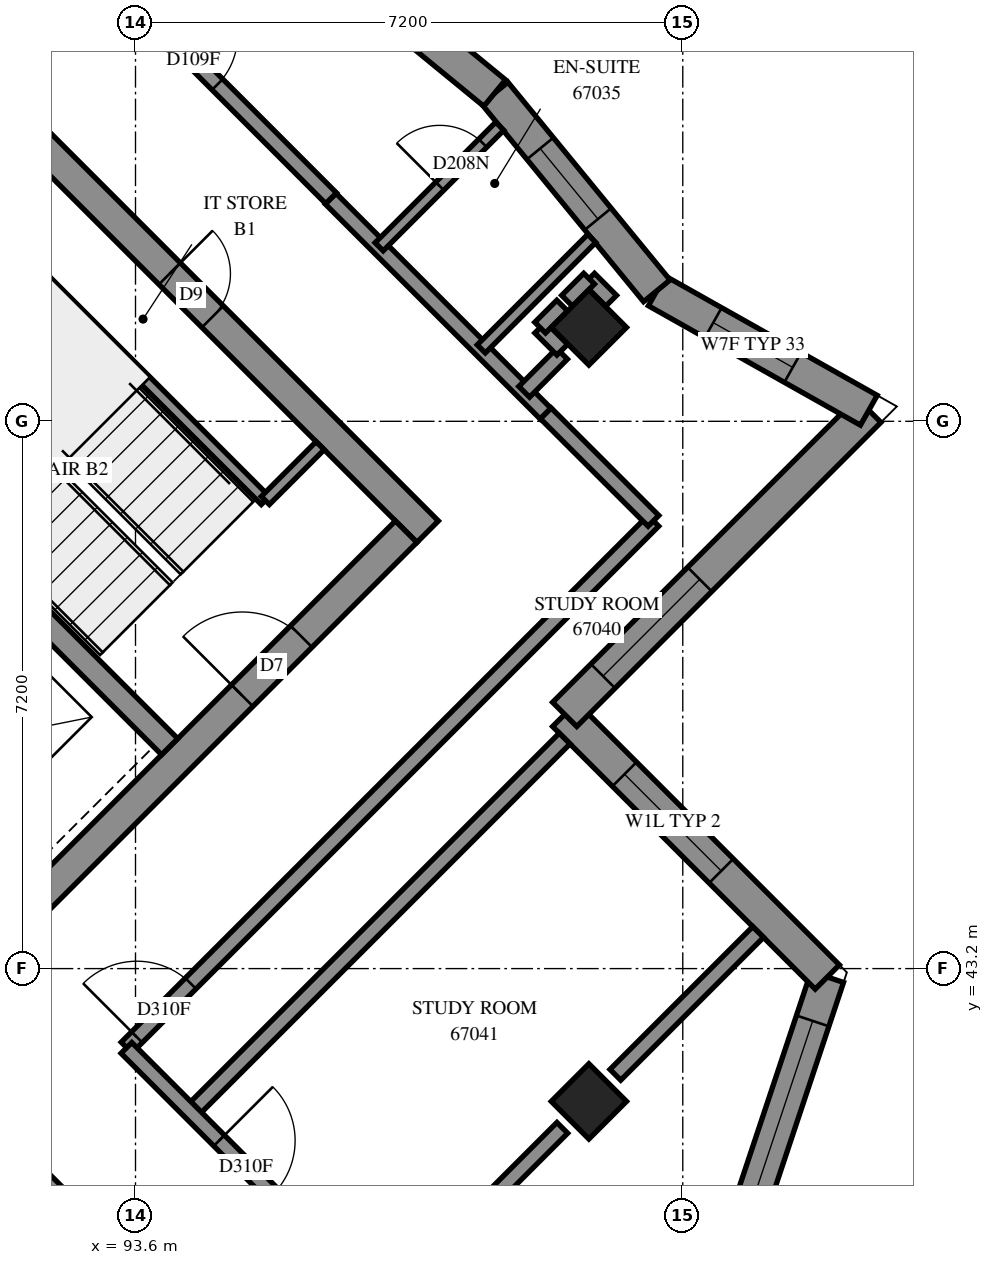
"""IFC4 building model, lengths in metres.
Left out: names, types, materials, properties, quantities, classifications, styles, units other than length and angle.
Written with IfcOpenShell. Run it as: python <this file> out.ifc"""

import sys

from ifc_helpers import new_model, si_unit, direction, frame, frame_2d, origin, origin_2d, place, context, subcontext, project, spatial, polyline, rectangle, outline, extrude, element, fill, save


model = new_model("IFC4")
c1 = context("Model", 3, precision=1e-05, world=origin(), true_north=direction((0.0, 1.0)))
c2 = subcontext(c1, "Body", "Model", "MODEL_VIEW")
j1 = project(units=[si_unit("LENGTHUNIT", "METRE"), si_unit("PLANEANGLEUNIT", "RADIAN")], contexts=[c1])
p1 = place(None, origin())
s1 = spatial("IfcSite", under=j1, at=p1, CompositionType="ELEMENT")
p2 = place(p1, origin())
s2 = spatial("IfcBuilding", under=s1, at=p2, CompositionType="ELEMENT")
p3 = place(p2, frame((0.0, 0.0, 247.2)))
s3 = spatial("IfcBuildingStorey", under=s2, at=p3, CompositionType="ELEMENT", Elevation=247.2)
for number, where, z_axis, x_axis in (
    (1, (99.565, 51.635, 0.0), (0.0, 0.0, 1.0), (0.707, -0.707, 0.0)),
    (2, (99.565, 41.453, 0.0), (0.0, 0.0, 1.0), (0.707, -0.707, 0.0)),
):
    element("IfcColumn", number, at=place(p3, frame(where, z_axis=z_axis, x_axis=x_axis)), inside=s3, PredefinedType="COLUMN", context=c2, shape_type="SweptSolid", body=[
        extrude(rectangle(XDim=0.7, YDim=0.7, at=origin_2d()), origin(), (0.0, 0.0, 1.0), 3.1),
    ])
p4 = place(p3, frame((86.695, 59.696, -0.3), z_axis=(0.0, 0.0, 1.0), x_axis=(0.7071100706, -0.7071034917, 0.0)))
e3 = element("IfcWall", 3, at=p4, inside=s3, PredefinedType="SHEAR", context=c2, shape_type="SweptSolid", body=[
    extrude(rectangle(XDim=15.2, YDim=0.4, at=frame_2d((7.6, 0.0))), origin(), (0.0, 0.0, 1.0), 2.7),
])
p5 = place(p4, frame((10.4, 0.0, 0.3)))
e4 = element("IfcOpeningElement", 4, at=p5, cuts=e3, PredefinedType="OPENING", context=c2, shape_type="SweptSolid", body=[
    extrude(rectangle(XDim=0.8, YDim=2.1, at=frame_2d((0.4, 1.05))), frame((0.0, 0.21, 0.0), z_axis=(0.0, -1.0, 0.0), x_axis=(1.0, 0.0, 0.0)), (0.0, 0.0, 1.0), 0.42),
])
p6 = place(p3, frame((86.978, 38.766, -0.3), z_axis=(0.0, 0.0, 1.0), x_axis=(0.7071067812, 0.7071067812, 0.0)))
e5 = element("IfcWall", 5, at=p6, inside=s3, PredefinedType="SHEAR", context=c2, shape_type="SweptSolid", body=[
    extrude(rectangle(XDim=14.4, YDim=0.4, at=frame_2d((7.2, 0.0))), origin(), (0.0, 0.0, 1.0), 2.7),
])
p7 = place(p6, frame((4.55, 0.0, 0.3)))
e6 = element("IfcOpeningElement", 6, at=p7, cuts=e5, PredefinedType="OPENING", context=c2, shape_type="SweptSolid", body=[
    extrude(rectangle(XDim=1.1, YDim=2.1, at=frame_2d((0.55, 1.05))), frame((0.0, 0.21, 0.0), z_axis=(0.0, -1.0, 0.0), x_axis=(1.0, 0.0, 0.0)), (0.0, 0.0, 1.0), 0.42),
])
p8 = place(p6, frame((11.35, 0.0, 0.3)))
e7 = element("IfcOpeningElement", 7, at=p8, cuts=e5, PredefinedType="OPENING", context=c2, shape_type="SweptSolid", body=[
    extrude(rectangle(XDim=1.1, YDim=2.1, at=frame_2d((0.55, 1.05))), frame((0.0, 0.21, 0.0), z_axis=(0.0, -1.0, 0.0), x_axis=(1.0, 0.0, 0.0)), (0.0, 0.0, 1.0), 0.42),
])
p9 = place(p3, frame((88.958, 51.211, 0.0), z_axis=(0.0, 0.0, 1.0), x_axis=(0.7070998367, -0.7071137256, 0.0)))
e8 = element("IfcWall", 8, at=p9, inside=s3, PredefinedType="SOLIDWALL", context=c2, shape_type="SweptSolid", body=[
    extrude(rectangle(XDim=7.2, YDim=0.3, at=frame_2d((3.6, 0.0))), origin(), (0.0, 0.0, 1.0), 3.1),
])
p10 = place(p3, frame((101.082, 38.232, 0.0), z_axis=(0.0, 0.0, 1.0), x_axis=(0.316227766, 0.9486832981, 0.0)))
e9 = element("IfcWall", 9, at=p10, inside=s3, PredefinedType="SOLIDWALL", context=c2, shape_type="SweptSolid", body=[
    extrude(outline(polyline([(-0.108, -0.225), (5.259, -0.225), (4.981, 0.225), (0.108, 0.225), (-0.108, -0.225)])), origin(), (0.0, 0.0, 1.0), 3.1),
])
p11 = place(p10, frame((1.711, 0.0, 0.45)))
e10 = element("IfcOpeningElement", 10, at=p11, cuts=e9, PredefinedType="OPENING", context=c2, shape_type="SweptSolid", body=[
    extrude(rectangle(XDim=2.8, YDim=2.55, at=frame_2d((1.4, 1.275))), frame((0.0, 0.235, 0.0), z_axis=(0.0, -1.0, 0.0), x_axis=(1.0, 0.0, 0.0)), (0.0, 0.0, 1.0), 0.47),
])
p12 = place(p3, frame((102.701, 43.089, 0.0), z_axis=(0.0, 0.0, 1.0), x_axis=(-0.7070965479, 0.7071170144, 0.0)))
e11 = element("IfcWall", 11, at=p12, inside=s3, PredefinedType="SOLIDWALL", context=c2, shape_type="SweptSolid", body=[
    extrude(outline(polyline([(-0.139, -0.225), (4.661, -0.225), (5.111, 0.225), (0.139, 0.225), (-0.139, -0.225)])), origin(), (0.0, 0.0, 1.0), 3.1),
])
p13 = place(p12, frame((1.974, 0.0, 0.6)))
e12 = element("IfcOpeningElement", 12, at=p13, cuts=e11, PredefinedType="OPENING", context=c2, shape_type="SweptSolid", body=[
    extrude(rectangle(XDim=1.8, YDim=1.9, at=frame_2d((0.9, 0.95))), frame((0.0, 0.235, 0.0), z_axis=(0.0, -1.0, 0.0), x_axis=(1.0, 0.0, 0.0)), (0.0, 0.0, 1.0), 0.47),
])
p14 = place(p3, frame((99.246, 46.544, 0.0), z_axis=(0.0, 0.0, 1.0), x_axis=(0.7071067812, 0.7071067812, 0.0)))
e13 = element("IfcWall", 13, at=p14, inside=s3, PredefinedType="SOLIDWALL", context=c2, shape_type="SweptSolid", body=[
    extrude(outline(polyline([(0.225, -0.225), (5.955, -0.225), (5.362, 0.225), (-0.225, 0.225), (0.225, -0.225)])), origin(), (0.0, 0.0, 1.0), 3.1),
])
p15 = place(p14, frame((0.713, 0.0, 0.6)))
e14 = element("IfcOpeningElement", 14, at=p15, cuts=e13, PredefinedType="OPENING", context=c2, shape_type="SweptSolid", body=[
    extrude(rectangle(XDim=1.8, YDim=1.9, at=frame_2d((0.9, 0.95))), frame((0.0, 0.235, 0.0), z_axis=(0.0, -1.0, 0.0), x_axis=(1.0, 0.0, 0.0)), (0.0, 0.0, 1.0), 0.47),
])
p16 = place(p3, frame((103.248, 50.545, 0.0), z_axis=(0.0, 0.0, 1.0), x_axis=(-0.8713209921, 0.4907134894, 0.0)))
e15 = element("IfcWall", 15, at=p16, inside=s3, PredefinedType="SOLIDWALL", context=c2, shape_type="SweptSolid", body=[
    extrude(outline(polyline([(-0.296, -0.225), (3.159, -0.225), (3.244, 0.225), (0.296, 0.225), (-0.296, -0.225)])), origin(), (0.0, 0.0, 1.0), 3.1),
])
p17 = place(p16, frame((1.149, 0.0, 0.45)))
e16 = element("IfcOpeningElement", 16, at=p17, cuts=e15, PredefinedType="OPENING", context=c2, shape_type="SweptSolid", body=[
    extrude(rectangle(XDim=1.2, YDim=2.55, at=frame_2d((0.6, 1.275))), frame((0.0, 0.235, 0.0), z_axis=(0.0, -1.0, 0.0), x_axis=(1.0, 0.0, 0.0)), (0.0, 0.0, 1.0), 0.47),
])
p18 = place(p3, frame((100.458, 52.116, 0.0), z_axis=(0.0, 0.0, 1.0), x_axis=(-0.6339011425, 0.7734140815, 0.0)))
e17 = element("IfcWall", 17, at=p18, inside=s3, PredefinedType="SOLIDWALL", context=c2, shape_type="SweptSolid", body=[
    extrude(outline(polyline([(0.042, -0.225), (3.387, -0.225), (3.342, 0.225), (-0.042, 0.225), (0.042, -0.225)])), origin(), (0.0, 0.0, 1.0), 3.1),
])
p19 = place(p18, frame((1.221, 0.0, 0.45)))
e18 = element("IfcOpeningElement", 18, at=p19, cuts=e17, PredefinedType="OPENING", context=c2, shape_type="SweptSolid", body=[
    extrude(rectangle(XDim=1.2, YDim=2.55, at=frame_2d((0.6, 1.275))), frame((0.0, 0.235, 0.0), z_axis=(0.0, -1.0, 0.0), x_axis=(1.0, 0.0, 0.0)), (0.0, 0.0, 1.0), 0.47),
])
p20 = place(p3, frame((98.325, 54.719, 0.0), z_axis=(0.0, 0.0, 1.0), x_axis=(-0.7734281512, 0.6338839759, 0.0)))
e19 = element("IfcWall", 19, at=p20, inside=s3, PredefinedType="SOLIDWALL", context=c2, shape_type="SweptSolid", body=[
    extrude(outline(polyline([(-0.022, -0.225), (3.322, -0.225), (3.367, 0.225), (0.022, 0.225), (-0.022, -0.225)])), origin(), (0.0, 0.0, 1.0), 3.1),
])
p21 = place(p20, frame((1.245, 0.0, 0.45)))
e20 = element("IfcOpeningElement", 20, at=p21, cuts=e19, PredefinedType="OPENING", context=c2, shape_type="SweptSolid", body=[
    extrude(rectangle(XDim=1.2, YDim=2.55, at=frame_2d((0.6, 1.275))), frame((0.0, 0.235, 0.0), z_axis=(0.0, -1.0, 0.0), x_axis=(1.0, 0.0, 0.0)), (0.0, 0.0, 1.0), 0.47),
])
p22 = place(p3, frame((91.313, 53.354, 0.0), z_axis=(0.0, 0.0, 1.0), x_axis=(0.7071067812, -0.7071067812, 0.0)))
e21 = element("IfcWall", 21, at=p22, inside=s3, PredefinedType="PARTITIONING", context=c2, shape_type="SweptSolid", body=[
    extrude(rectangle(XDim=5.65, YDim=0.15, at=frame_2d((2.825, 0.0))), origin(), (0.0, 0.0, 1.0), 3.1),
])
p23 = place(p3, frame((95.308, 49.358, 0.0), z_axis=(0.0, 0.0, 1.0), x_axis=(0.70705776, 0.707155799, 0.0)))
e22 = element("IfcWall", 22, at=p23, inside=s3, PredefinedType="PARTITIONING", context=c2, shape_type="SweptSolid", body=[
    extrude(rectangle(XDim=1.02, YDim=0.15, at=frame_2d((0.51, 0.0))), origin(), (0.0, 0.0, 1.0), 3.1),
])
p24 = place(p3, frame((93.483, 42.161, 0.0), z_axis=(0.0, 0.0, 1.0), x_axis=(0.7071067812, 0.7071067812, 0.0)))
e23 = element("IfcWall", 23, at=p24, inside=s3, PredefinedType="PARTITIONING", context=c2, shape_type="SweptSolid", body=[
    extrude(rectangle(XDim=9.8, YDim=0.2, at=frame_2d((4.9, 0.0))), origin(), (0.0, 0.0, 1.0), 3.1),
])
p25 = place(p24, frame((0.193, 0.0, 0.0)))
e24 = element("IfcOpeningElement", 24, at=p25, cuts=e23, PredefinedType="OPENING", context=c2, shape_type="SweptSolid", body=[
    extrude(rectangle(XDim=1.0, YDim=2.1, at=frame_2d((0.5, 1.05))), frame((0.0, 0.11, 0.0), z_axis=(0.0, -1.0, 0.0), x_axis=(1.0, 0.0, 0.0)), (0.0, 0.0, 1.0), 0.22),
])
p26 = place(p3, frame((94.331, 41.313, 0.0), z_axis=(0.0, 0.0, 1.0), x_axis=(0.7071139756, 0.7070995867, 0.0)))
e25 = element("IfcWall", 25, at=p26, inside=s3, PredefinedType="PARTITIONING", context=c2, shape_type="SweptSolid", body=[
    extrude(rectangle(XDim=6.95, YDim=0.2, at=frame_2d((3.475, 0.0))), origin(), (0.0, 0.0, 1.0), 3.1),
])
p27 = place(p3, frame((93.481, 42.157, 0.0), z_axis=(0.0, 0.0, 1.0), x_axis=(0.7071067812, -0.7071067812, 0.0)))
e26 = element("IfcWall", 26, at=p27, inside=s3, PredefinedType="PARTITIONING", context=c2, shape_type="SweptSolid", body=[
    extrude(rectangle(XDim=4.8, YDim=0.2, at=frame_2d((2.4, 0.0))), origin(), (0.0, 0.0, 1.0), 3.1),
])
p28 = place(p27, frame((1.725, 0.0, 0.0)))
e27 = element("IfcOpeningElement", 27, at=p28, cuts=e26, PredefinedType="OPENING", context=c2, shape_type="SweptSolid", body=[
    extrude(rectangle(XDim=1.0, YDim=2.1, at=frame_2d((0.5, 1.05))), frame((0.0, 0.11, 0.0), z_axis=(0.0, -1.0, 0.0), x_axis=(1.0, 0.0, 0.0)), (0.0, 0.0, 1.0), 0.22),
])
p29 = place(p3, frame((92.073, 40.749, 0.0), z_axis=(0.0, 0.0, 1.0), x_axis=(0.7071067812, -0.7071067812, 0.0)))
e28 = element("IfcWall", 28, at=p29, inside=s3, PredefinedType="PARTITIONING", context=c2, shape_type="SweptSolid", body=[
    extrude(rectangle(XDim=4.8, YDim=0.2, at=frame_2d((2.4, 0.0))), origin(), (0.0, 0.0, 1.0), 3.1),
])
p30 = place(p29, frame((1.725, 0.0, 0.0)))
e29 = element("IfcOpeningElement", 29, at=p30, cuts=e28, PredefinedType="OPENING", context=c2, shape_type="SweptSolid", body=[
    extrude(rectangle(XDim=1.0, YDim=2.1, at=frame_2d((0.5, 1.05))), frame((0.0, 0.11, 0.0), z_axis=(0.0, -1.0, 0.0), x_axis=(1.0, 0.0, 0.0)), (0.0, 0.0, 1.0), 0.22),
])
p31 = place(p3, frame((96.167, 53.329, 0.0), z_axis=(0.0, 0.0, 1.0), x_axis=(0.7071067812, -0.7071067812, 0.0)))
e30 = element("IfcWall", 30, at=p31, inside=s3, PredefinedType="PARTITIONING", context=c2, shape_type="SweptSolid", body=[
    extrude(rectangle(XDim=3.999, YDim=0.2, at=frame_2d((2.0, 0.0))), origin(), (0.0, 0.0, 1.0), 3.1),
])
p32 = place(p3, frame((93.629, 55.881, 0.0), z_axis=(0.0, 0.0, 1.0), x_axis=(0.7068288851, -0.7073845681, 0.0)))
e31 = element("IfcWall", 31, at=p32, inside=s3, PredefinedType="PARTITIONING", context=c2, shape_type="SweptSolid", body=[
    extrude(rectangle(XDim=3.599, YDim=0.2, at=frame_2d((1.8, 0.0))), origin(), (0.0, 0.0, 1.0), 3.1),
])
p33 = place(p32, frame((0.584, 0.0, 0.0)))
e32 = element("IfcOpeningElement", 32, at=p33, cuts=e31, PredefinedType="OPENING", context=c2, shape_type="SweptSolid", body=[
    extrude(rectangle(XDim=0.9, YDim=2.1, at=frame_2d((0.45, 1.05))), frame((0.0, 0.11, 0.0), z_axis=(0.0, -1.0, 0.0), x_axis=(1.0, 0.0, 0.0)), (0.0, 0.0, 1.0), 0.22),
])
p34 = place(p3, frame((96.877, 38.767, 0.0), z_axis=(0.0, 0.0, 1.0), x_axis=(0.7071067812, 0.7071067812, 0.0)))
e33 = element("IfcWall", 33, at=p34, inside=s3, PredefinedType="PARTITIONING", context=c2, shape_type="SweptSolid", body=[
    extrude(rectangle(XDim=3.306, YDim=0.2, at=frame_2d((1.653, 0.0))), origin(), (0.0, 0.0, 1.0), 2.6),
])
p35 = place(p3, frame((99.913, 41.803, 0.0), z_axis=(0.0, 0.0, 1.0), x_axis=(0.7071067812, 0.7071067812, 0.0)))
e34 = element("IfcWall", 34, at=p35, inside=s3, PredefinedType="PARTITIONING", context=c2, shape_type="SweptSolid", body=[
    extrude(rectangle(XDim=2.656, YDim=0.2, at=frame_2d((1.328, 0.0))), origin(), (0.0, 0.0, 1.0), 3.1),
])
p36 = place(p3, frame((96.806, 52.696, 0.0), z_axis=(0.0, 0.0, 1.0), x_axis=(0.7070844922, 0.7071290695, 0.0)))
e35 = element("IfcWall", 35, at=p36, inside=s3, PredefinedType="PARTITIONING", context=c2, shape_type="SweptSolid", body=[
    extrude(rectangle(XDim=2.243, YDim=0.15, at=frame_2d((1.122, 0.0))), origin(), (0.0, 0.0, 1.0), 3.1),
])
p37 = place(p36, frame((1.128, 0.0, 0.0)))
e36 = element("IfcOpeningElement", 36, at=p37, cuts=e35, PredefinedType="OPENING", context=c2, shape_type="SweptSolid", body=[
    extrude(rectangle(XDim=0.8, YDim=2.1, at=frame_2d((0.4, 1.05))), frame((0.0, 0.085, 0.0), z_axis=(0.0, -1.0, 0.0), x_axis=(1.0, 0.0, 0.0)), (0.0, 0.0, 1.0), 0.17),
])
p38 = place(p3, frame((98.149, 51.353, 0.0), z_axis=(0.0, 0.0, 1.0), x_axis=(0.707082449, 0.7071311126, 0.0)))
e37 = element("IfcWall", 37, at=p38, inside=s3, PredefinedType="PARTITIONING", context=c2, shape_type="SweptSolid", body=[
    extrude(rectangle(XDim=2.055, YDim=0.15, at=frame_2d((1.027, 0.0))), origin(), (0.0, 0.0, 1.0), 3.1),
])
p39 = place(p3, frame((98.998, 50.504, 0.0), z_axis=(0.0, 0.0, 1.0), x_axis=(0.7076063266, -0.7066068826, 0.0)))
e38 = element("IfcWall", 38, at=p39, inside=s3, PredefinedType="PARTITIONING", context=c2, shape_type="SweptSolid", body=[
    extrude(rectangle(XDim=2.001, YDim=0.2, at=frame_2d((1.001, 0.0))), origin(), (0.0, 0.0, 1.0), 3.1),
])
p40 = place(p3, frame((98.714, 50.788, 0.0), z_axis=(0.0, 0.0, 1.0), x_axis=(0.7056883165, 0.7085224061, 0.0)))
e39 = element("IfcWall", 39, at=p40, inside=s3, PredefinedType="PARTITIONING", context=c2, shape_type="SweptSolid", body=[
    extrude(rectangle(XDim=0.706, YDim=0.2, at=frame_2d((0.353, 0.0))), origin(), (0.0, 0.0, 1.0), 3.1),
])
for number, where, z_axis, x_axis in (
    (40, (99.568, 52.276, 0.0), (0.0, 0.0, 1.0), (0.707, -0.707, 0.0)),
    (41, (99.278, 51.986, 0.0), (0.0, 0.0, 1.0), (0.707, 0.707, 0.0)),
    (42, (98.925, 51.633, 0.0), (0.0, 0.0, 1.0), (0.707, -0.707, 0.0)),
    (43, (98.924, 51.632, 0.0), (0.0, 0.0, 1.0), (0.707, 0.707, 0.0)),
):
    element("IfcWall", number, at=place(p3, frame(where, z_axis=z_axis, x_axis=x_axis)), inside=s3, PredefinedType="PARTITIONING", context=c2, shape_type="SweptSolid", body=[
        extrude(rectangle(XDim=0.41, YDim=0.2, at=frame_2d((0.205, 0.0))), origin(), (0.0, 0.0, 1.0), 3.1),
    ])
p41 = place(p11, origin())
e44 = element("IfcWindow", 44, at=p41, inside=s3, PartitioningType="SINGLE_PANEL", PredefinedType="WINDOW", context=c2, shape_type="SweptSolid", body=[
    extrude(rectangle(XDim=2.8, YDim=2.55, at=frame_2d((1.4, 1.275))), frame((0.0, 0.205, 0.0), z_axis=(0.0, -1.0, 0.0), x_axis=(1.0, 0.0, 0.0)), (0.0, 0.0, 1.0), 0.06),
])
fill(e10, e44)
p42 = place(p13, origin())
e45 = element("IfcWindow", 45, at=p42, inside=s3, PartitioningType="SINGLE_PANEL", PredefinedType="WINDOW", context=c2, shape_type="SweptSolid", body=[
    extrude(rectangle(XDim=1.8, YDim=1.9, at=frame_2d((0.9, 0.95))), frame((0.0, 0.205, 0.0), z_axis=(0.0, -1.0, 0.0), x_axis=(1.0, 0.0, 0.0)), (0.0, 0.0, 1.0), 0.06),
])
fill(e12, e45)
p43 = place(p15, origin())
e46 = element("IfcWindow", 46, at=p43, inside=s3, PartitioningType="SINGLE_PANEL", PredefinedType="WINDOW", context=c2, shape_type="SweptSolid", body=[
    extrude(rectangle(XDim=1.8, YDim=1.9, at=frame_2d((0.9, 0.95))), frame((0.0, 0.205, 0.0), z_axis=(0.0, -1.0, 0.0), x_axis=(1.0, 0.0, 0.0)), (0.0, 0.0, 1.0), 0.06),
])
fill(e14, e46)
p44 = place(p17, origin())
e47 = element("IfcWindow", 47, at=p44, inside=s3, PartitioningType="SINGLE_PANEL", PredefinedType="WINDOW", context=c2, shape_type="SweptSolid", body=[
    extrude(rectangle(XDim=1.2, YDim=2.55, at=frame_2d((0.6, 1.275))), frame((0.0, 0.205, 0.0), z_axis=(0.0, -1.0, 0.0), x_axis=(1.0, 0.0, 0.0)), (0.0, 0.0, 1.0), 0.06),
])
fill(e16, e47)
p45 = place(p19, origin())
e48 = element("IfcWindow", 48, at=p45, inside=s3, PartitioningType="SINGLE_PANEL", PredefinedType="WINDOW", context=c2, shape_type="SweptSolid", body=[
    extrude(rectangle(XDim=1.2, YDim=2.55, at=frame_2d((0.6, 1.275))), frame((0.0, 0.205, 0.0), z_axis=(0.0, -1.0, 0.0), x_axis=(1.0, 0.0, 0.0)), (0.0, 0.0, 1.0), 0.06),
])
fill(e18, e48)
p46 = place(p5, origin())
e49 = element("IfcDoor", 49, at=p46, inside=s3, OperationType="SINGLE_SWING_RIGHT", PredefinedType="DOOR", context=c2, shape_type="SweptSolid", body=[
    extrude(rectangle(XDim=0.8, YDim=2.1, at=frame_2d((0.4, 1.05))), frame((0.0, 0.025, 0.0), z_axis=(0.0, -1.0, 0.0), x_axis=(1.0, 0.0, 0.0)), (0.0, 0.0, 1.0), 0.05),
])
fill(e4, e49)
p47 = place(p8, origin())
e50 = element("IfcDoor", 50, at=p47, inside=s3, OperationType="SINGLE_SWING_RIGHT", PredefinedType="DOOR", context=c2, shape_type="SweptSolid", body=[
    extrude(rectangle(XDim=1.1, YDim=2.1, at=frame_2d((0.55, 1.05))), frame((0.0, 0.025, 0.0), z_axis=(0.0, -1.0, 0.0), x_axis=(1.0, 0.0, 0.0)), (0.0, 0.0, 1.0), 0.05),
])
fill(e7, e50)
p48 = place(p33, origin())
e51 = element("IfcDoor", 51, at=p48, inside=s3, OperationType="SINGLE_SWING_LEFT", PredefinedType="DOOR", context=c2, shape_type="SweptSolid", body=[
    extrude(rectangle(XDim=0.9, YDim=2.1, at=frame_2d((0.45, 1.05))), frame((0.0, 0.025, 0.0), z_axis=(0.0, -1.0, 0.0), x_axis=(1.0, 0.0, 0.0)), (0.0, 0.0, 1.0), 0.05),
])
fill(e32, e51)
p49 = place(p37, origin())
e52 = element("IfcDoor", 52, at=p49, inside=s3, OperationType="SINGLE_SWING_RIGHT", PredefinedType="DOOR", context=c2, shape_type="SweptSolid", body=[
    extrude(rectangle(XDim=0.8, YDim=2.1, at=frame_2d((0.4, 1.05))), frame((0.0, 0.025, 0.0), z_axis=(0.0, -1.0, 0.0), x_axis=(1.0, 0.0, 0.0)), (0.0, 0.0, 1.0), 0.05),
])
fill(e36, e52)
p50 = place(p25, origin())
e53 = element("IfcDoor", 53, at=p50, inside=s3, OperationType="SINGLE_SWING_LEFT", PredefinedType="DOOR", context=c2, shape_type="SweptSolid", body=[
    extrude(rectangle(XDim=1.0, YDim=2.1, at=frame_2d((0.5, 1.05))), frame((0.0, 0.025, 0.0), z_axis=(0.0, -1.0, 0.0), x_axis=(1.0, 0.0, 0.0)), (0.0, 0.0, 1.0), 0.05),
])
fill(e24, e53)
p51 = place(p28, origin())
e54 = element("IfcDoor", 54, at=p51, inside=s3, OperationType="SINGLE_SWING_RIGHT", PredefinedType="DOOR", context=c2, shape_type="SweptSolid", body=[
    extrude(rectangle(XDim=1.0, YDim=2.1, at=frame_2d((0.5, 1.05))), frame((0.0, 0.025, 0.0), z_axis=(0.0, -1.0, 0.0), x_axis=(1.0, 0.0, 0.0)), (0.0, 0.0, 1.0), 0.05),
])
fill(e27, e54)
save(model, sys.argv[1])
